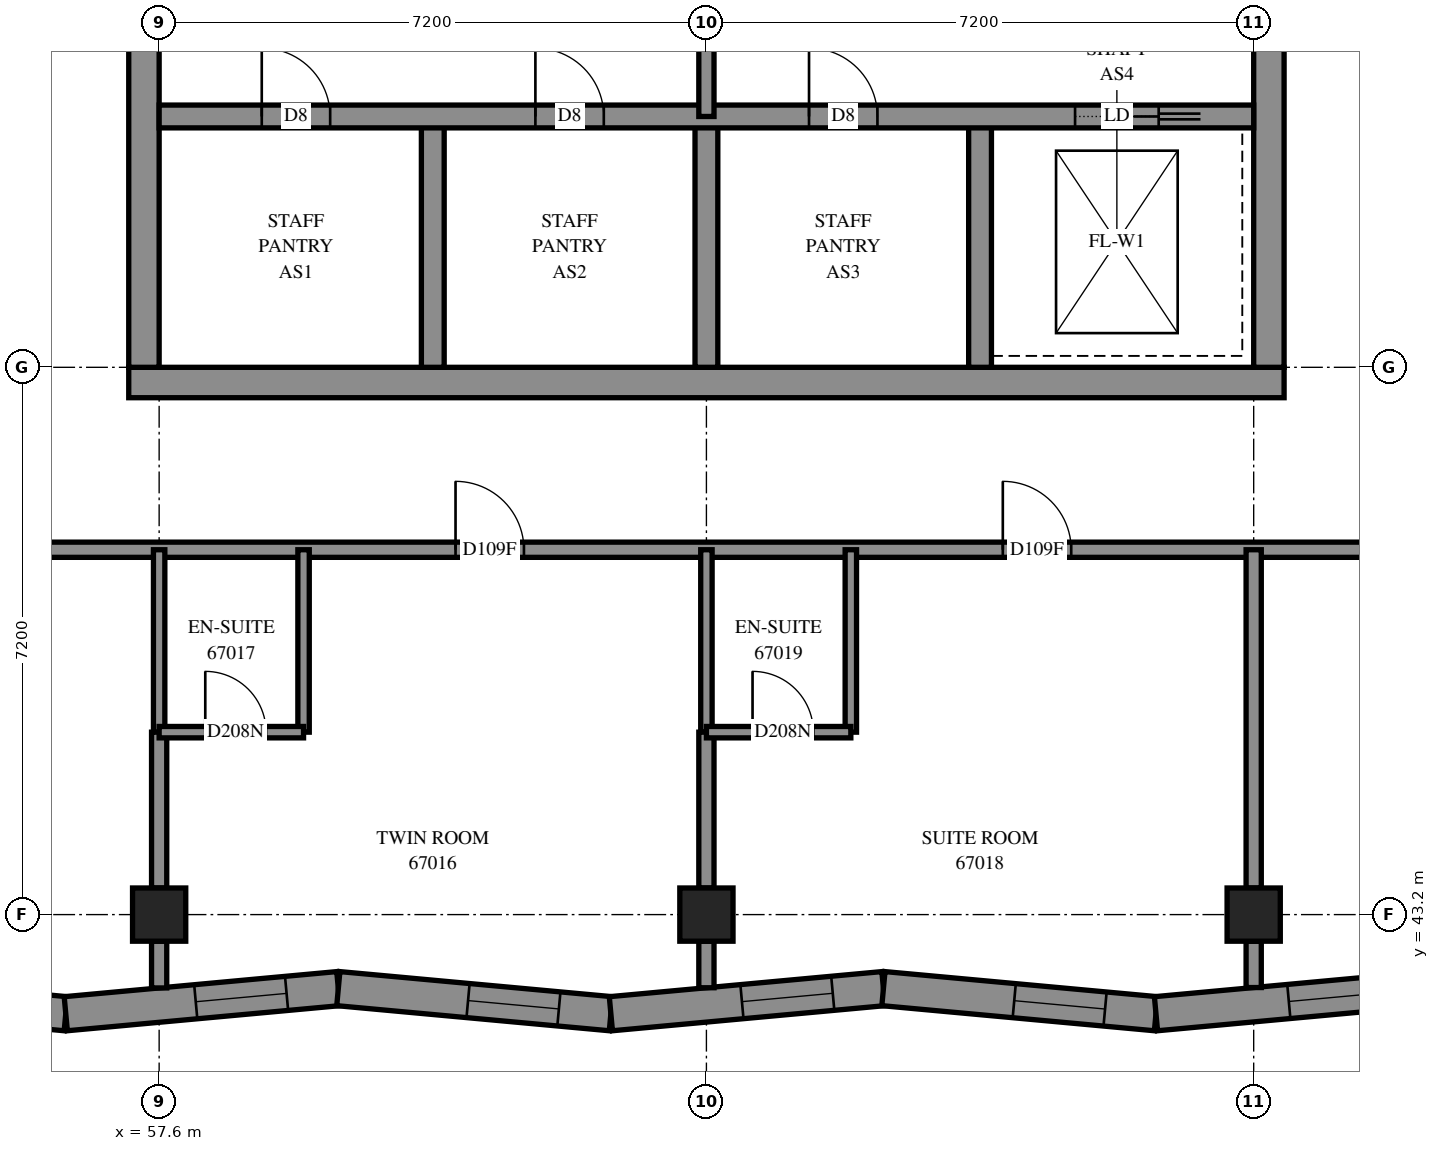
"""IFC4 building model, lengths in metres.
Left out: names, types, materials, properties, quantities, classifications, styles, units other than length and angle.
Written with IfcOpenShell. Run it as: python <this file> out.ifc"""

import sys

from ifc_helpers import new_model, si_unit, direction, frame, frame_2d, origin, origin_2d, place, context, subcontext, project, spatial, polyline, rectangle, outline, extrude, element, fill, save


model = new_model("IFC4")
c1 = context("Model", 3, precision=1e-05, world=origin(), true_north=direction((0.0, 1.0)))
c2 = subcontext(c1, "Body", "Model", "MODEL_VIEW")
j1 = project(units=[si_unit("LENGTHUNIT", "METRE"), si_unit("PLANEANGLEUNIT", "RADIAN")], contexts=[c1])
p1 = place(None, origin())
s1 = spatial("IfcSite", under=j1, at=p1, CompositionType="ELEMENT")
p2 = place(p1, origin())
s2 = spatial("IfcBuilding", under=s1, at=p2, CompositionType="ELEMENT")
p3 = place(p2, frame((0.0, 0.0, 247.2)))
s3 = spatial("IfcBuildingStorey", under=s2, at=p3, CompositionType="ELEMENT", Elevation=247.2)
for number, where, z_axis, x_axis in (
    (1, (57.6, 43.2, 0.0), (0.0, 0.0, 1.0), (1.0, 0.0, 0.0)),
    (2, (64.8, 43.2, 0.0), (0.0, 0.0, 1.0), (1.0, 0.0, 0.0)),
    (3, (72.0, 43.2, 0.0), (0.0, 0.0, 1.0), (1.0, 0.0, 0.0)),
):
    element("IfcColumn", number, at=place(p3, frame(where, z_axis=z_axis, x_axis=x_axis)), inside=s3, PredefinedType="COLUMN", context=c2, shape_type="SweptSolid", body=[
        extrude(rectangle(XDim=0.7, YDim=0.7, at=origin_2d()), origin(), (0.0, 0.0, 1.0), 3.1),
    ])
p4 = place(p3, frame((57.2, 50.2, -0.3), z_axis=(0.0, 0.0, 1.0), x_axis=(1.0, 0.0, 0.0)))
e4 = element("IfcWall", 4, at=p4, inside=s3, PredefinedType="SHEAR", context=c2, shape_type="SweptSolid", body=[
    extrude(rectangle(XDim=15.2, YDim=0.4, at=frame_2d((7.6, 0.0))), origin(), (0.0, 0.0, 1.0), 2.7),
])
p5 = place(p3, frame((57.4, 50.4, -0.3), z_axis=(0.0, 0.0, 1.0), x_axis=(0.0, 1.0, 0.0)))
e5 = element("IfcWall", 5, at=p5, inside=s3, PredefinedType="SHEAR", context=c2, shape_type="SweptSolid", body=[
    extrude(rectangle(XDim=14.4, YDim=0.4, at=frame_2d((7.2, 0.0))), origin(), (0.0, 0.0, 1.0), 2.7),
])
p6 = place(p5, frame((4.55, 0.0, 0.3)))
e6 = element("IfcOpeningElement", 6, at=p6, cuts=e5, PredefinedType="OPENING", context=c2, shape_type="SweptSolid", body=[
    extrude(rectangle(XDim=1.1, YDim=2.1, at=frame_2d((0.55, 1.05))), frame((0.0, 0.21, 0.0), z_axis=(0.0, -1.0, 0.0), x_axis=(1.0, 0.0, 0.0)), (0.0, 0.0, 1.0), 0.42),
])
p7 = place(p5, frame((11.35, 0.0, 0.3)))
e7 = element("IfcOpeningElement", 7, at=p7, cuts=e5, PredefinedType="OPENING", context=c2, shape_type="SweptSolid", body=[
    extrude(rectangle(XDim=1.1, YDim=2.1, at=frame_2d((0.55, 1.05))), frame((0.0, 0.21, 0.0), z_axis=(0.0, -1.0, 0.0), x_axis=(1.0, 0.0, 0.0)), (0.0, 0.0, 1.0), 0.42),
])
p8 = place(p3, frame((72.2, 50.4, -0.3), z_axis=(0.0, 0.0, 1.0), x_axis=(0.0, 1.0, 0.0)))
e8 = element("IfcWall", 8, at=p8, inside=s3, PredefinedType="SHEAR", context=c2, shape_type="SweptSolid", body=[
    extrude(rectangle(XDim=14.4, YDim=0.4, at=frame_2d((7.2, 0.0))), origin(), (0.0, 0.0, 1.0), 2.7),
])
p9 = place(p8, frame((4.55, 0.0, 0.3)))
e9 = element("IfcOpeningElement", 9, at=p9, cuts=e8, PredefinedType="OPENING", context=c2, shape_type="SweptSolid", body=[
    extrude(rectangle(XDim=1.1, YDim=2.1, at=frame_2d((0.55, 1.05))), frame((0.0, 0.21, 0.0), z_axis=(0.0, -1.0, 0.0), x_axis=(1.0, 0.0, 0.0)), (0.0, 0.0, 1.0), 0.42),
])
p10 = place(p8, frame((11.35, 0.0, 0.3)))
e10 = element("IfcOpeningElement", 10, at=p10, cuts=e8, PredefinedType="OPENING", context=c2, shape_type="SweptSolid", body=[
    extrude(rectangle(XDim=1.1, YDim=2.1, at=frame_2d((0.55, 1.05))), frame((0.0, 0.21, 0.0), z_axis=(0.0, -1.0, 0.0), x_axis=(1.0, 0.0, 0.0)), (0.0, 0.0, 1.0), 0.42),
])
for number, where, z_axis, x_axis in (
    (11, (61.2, 50.4, 0.0), (0.0, 0.0, 1.0), (0.0, 1.0, 0.0)),
    (12, (64.8, 50.4, 0.0), (0.0, 0.0, 1.0), (0.0, 1.0, 0.0)),
    (13, (68.4, 50.4, 0.0), (0.0, 0.0, 1.0), (0.0, 1.0, 0.0)),
):
    element("IfcWall", number, at=place(p3, frame(where, z_axis=z_axis, x_axis=x_axis)), inside=s3, PredefinedType="SOLIDWALL", context=c2, shape_type="SweptSolid", body=[
        extrude(rectangle(XDim=3.3, YDim=0.3, at=frame_2d((1.65, 0.0))), origin(), (0.0, 0.0, 1.0), 3.1),
    ])
p11 = place(p3, frame((57.6, 53.7, 0.0), z_axis=(0.0, 0.0, 1.0), x_axis=(1.0, 0.0, 0.0)))
e14 = element("IfcWall", 14, at=p11, inside=s3, PredefinedType="SOLIDWALL", context=c2, shape_type="SweptSolid", body=[
    extrude(rectangle(XDim=14.4, YDim=0.3, at=frame_2d((7.2, 0.0))), origin(), (0.0, 0.0, 1.0), 3.1),
])
p12 = place(p11, frame((1.35, 0.0, 0.0)))
e15 = element("IfcOpeningElement", 15, at=p12, cuts=e14, PredefinedType="OPENING", context=c2, shape_type="SweptSolid", body=[
    extrude(rectangle(XDim=0.9, YDim=2.1, at=frame_2d((0.45, 1.05))), frame((0.0, 0.16, 0.0), z_axis=(0.0, -1.0, 0.0), x_axis=(1.0, 0.0, 0.0)), (0.0, 0.0, 1.0), 0.32),
])
p13 = place(p11, frame((4.95, 0.0, 0.0)))
e16 = element("IfcOpeningElement", 16, at=p13, cuts=e14, PredefinedType="OPENING", context=c2, shape_type="SweptSolid", body=[
    extrude(rectangle(XDim=0.9, YDim=2.1, at=frame_2d((0.45, 1.05))), frame((0.0, 0.16, 0.0), z_axis=(0.0, -1.0, 0.0), x_axis=(1.0, 0.0, 0.0)), (0.0, 0.0, 1.0), 0.32),
])
p14 = place(p11, frame((8.55, 0.0, 0.0)))
e17 = element("IfcOpeningElement", 17, at=p14, cuts=e14, PredefinedType="OPENING", context=c2, shape_type="SweptSolid", body=[
    extrude(rectangle(XDim=0.9, YDim=2.1, at=frame_2d((0.45, 1.05))), frame((0.0, 0.16, 0.0), z_axis=(0.0, -1.0, 0.0), x_axis=(1.0, 0.0, 0.0)), (0.0, 0.0, 1.0), 0.32),
])
p15 = place(p11, frame((12.05, 0.0, 0.0)))
e18 = element("IfcOpeningElement", 18, at=p15, cuts=e14, PredefinedType="OPENING", context=c2, shape_type="SweptSolid", body=[
    extrude(rectangle(XDim=1.1, YDim=2.1, at=frame_2d((0.55, 1.05))), frame((0.0, 0.16, 0.0), z_axis=(0.0, -1.0, 0.0), x_axis=(1.0, 0.0, 0.0)), (0.0, 0.0, 1.0), 0.32),
])
p16 = place(p3, frame((52.767, 42.228, 0.0), z_axis=(0.0, 0.0, 1.0), x_axis=(0.9957918129, -0.0916442329, 0.0)))
e19 = element("IfcWall", 19, at=p16, inside=s3, PredefinedType="SOLIDWALL", context=c2, shape_type="SweptSolid", body=[
    extrude(outline(polyline([(0.039, -0.225), (3.64, -0.225), (3.599, 0.225), (-0.039, 0.225), (0.039, -0.225)])), origin(), (0.0, 0.0, 1.0), 3.1),
])
p17 = place(p16, frame((1.718, 0.0, 0.45)))
e20 = element("IfcOpeningElement", 20, at=p17, cuts=e19, PredefinedType="OPENING", context=c2, shape_type="SweptSolid", body=[
    extrude(rectangle(XDim=1.2, YDim=2.55, at=frame_2d((0.6, 1.275))), frame((0.0, 0.235, 0.0), z_axis=(0.0, -1.0, 0.0), x_axis=(1.0, 0.0, 0.0)), (0.0, 0.0, 1.0), 0.47),
])
p18 = place(p3, frame((56.371, 41.896, 0.0), z_axis=(0.0, 0.0, 1.0), x_axis=(0.9957917474, 0.0916449443, 0.0)))
e21 = element("IfcWall", 21, at=p18, inside=s3, PredefinedType="SOLIDWALL", context=c2, shape_type="SweptSolid", body=[
    extrude(outline(polyline([(-0.021, -0.225), (3.58, -0.225), (3.622, 0.225), (0.021, 0.225), (-0.021, -0.225)])), origin(), (0.0, 0.0, 1.0), 3.1),
])
p19 = place(p18, frame((1.717, 0.0, 0.45)))
e22 = element("IfcOpeningElement", 22, at=p19, cuts=e21, PredefinedType="OPENING", context=c2, shape_type="SweptSolid", body=[
    extrude(rectangle(XDim=1.2, YDim=2.55, at=frame_2d((0.6, 1.275))), frame((0.0, 0.235, 0.0), z_axis=(0.0, -1.0, 0.0), x_axis=(1.0, 0.0, 0.0)), (0.0, 0.0, 1.0), 0.47),
])
p20 = place(p3, frame((59.957, 42.226, 0.0), z_axis=(0.0, 0.0, 1.0), x_axis=(0.9957917474, -0.0916449443, 0.0)))
e23 = element("IfcWall", 23, at=p20, inside=s3, PredefinedType="SOLIDWALL", context=c2, shape_type="SweptSolid", body=[
    extrude(outline(polyline([(0.021, -0.225), (3.622, -0.225), (3.58, 0.225), (-0.021, 0.225), (0.021, -0.225)])), origin(), (0.0, 0.0, 1.0), 3.1),
])
p21 = place(p20, frame((1.714, 0.0, 0.45)))
e24 = element("IfcOpeningElement", 24, at=p21, cuts=e23, PredefinedType="OPENING", context=c2, shape_type="SweptSolid", body=[
    extrude(rectangle(XDim=1.2, YDim=2.55, at=frame_2d((0.6, 1.275))), frame((0.0, 0.235, 0.0), z_axis=(0.0, -1.0, 0.0), x_axis=(1.0, 0.0, 0.0)), (0.0, 0.0, 1.0), 0.47),
])
p22 = place(p3, frame((63.543, 41.896, 0.0), z_axis=(0.0, 0.0, 1.0), x_axis=(0.9957919806, 0.09164241, 0.0)))
e25 = element("IfcWall", 25, at=p22, inside=s3, PredefinedType="SOLIDWALL", context=c2, shape_type="SweptSolid", body=[
    extrude(outline(polyline([(-0.021, -0.225), (3.58, -0.225), (3.622, 0.225), (0.021, 0.225), (-0.021, -0.225)])), origin(), (0.0, 0.0, 1.0), 3.1),
])
p23 = place(p22, frame((1.732, 0.0, 0.45)))
e26 = element("IfcOpeningElement", 26, at=p23, cuts=e25, PredefinedType="OPENING", context=c2, shape_type="SweptSolid", body=[
    extrude(rectangle(XDim=1.2, YDim=2.55, at=frame_2d((0.6, 1.275))), frame((0.0, 0.235, 0.0), z_axis=(0.0, -1.0, 0.0), x_axis=(1.0, 0.0, 0.0)), (0.0, 0.0, 1.0), 0.47),
])
p24 = place(p3, frame((67.129, 42.226, 0.0), z_axis=(0.0, 0.0, 1.0), x_axis=(0.9957917474, -0.0916449443, 0.0)))
e27 = element("IfcWall", 27, at=p24, inside=s3, PredefinedType="SOLIDWALL", context=c2, shape_type="SweptSolid", body=[
    extrude(outline(polyline([(0.021, -0.225), (3.622, -0.225), (3.58, 0.225), (-0.021, 0.225), (0.021, -0.225)])), origin(), (0.0, 0.0, 1.0), 3.1),
])
p25 = place(p24, frame((1.728, 0.0, 0.45)))
e28 = element("IfcOpeningElement", 28, at=p25, cuts=e27, PredefinedType="OPENING", context=c2, shape_type="SweptSolid", body=[
    extrude(rectangle(XDim=1.2, YDim=2.55, at=frame_2d((0.6, 1.275))), frame((0.0, 0.235, 0.0), z_axis=(0.0, -1.0, 0.0), x_axis=(1.0, 0.0, 0.0)), (0.0, 0.0, 1.0), 0.47),
])
p26 = place(p3, frame((70.714, 41.896, 0.0), z_axis=(0.0, 0.0, 1.0), x_axis=(0.9957918129, 0.0916442329, 0.0)))
e29 = element("IfcWall", 29, at=p26, inside=s3, PredefinedType="SOLIDWALL", context=c2, shape_type="SweptSolid", body=[
    extrude(outline(polyline([(-0.021, -0.225), (3.58, -0.225), (3.659, 0.225), (0.021, 0.225), (-0.021, -0.225)])), origin(), (0.0, 0.0, 1.0), 3.1),
])
p27 = place(p26, frame((1.755, 0.0, 0.45)))
e30 = element("IfcOpeningElement", 30, at=p27, cuts=e29, PredefinedType="OPENING", context=c2, shape_type="SweptSolid", body=[
    extrude(rectangle(XDim=1.2, YDim=2.55, at=frame_2d((0.6, 1.275))), frame((0.0, 0.235, 0.0), z_axis=(0.0, -1.0, 0.0), x_axis=(1.0, 0.0, 0.0)), (0.0, 0.0, 1.0), 0.47),
])
p28 = place(p3, frame((64.8, 53.7, 0.0), z_axis=(0.0, 0.0, 1.0), x_axis=(0.0, 1.0, 0.0)))
e31 = element("IfcWall", 31, at=p28, inside=s3, PredefinedType="PARTITIONING", context=c2, shape_type="SweptSolid", body=[
    extrude(rectangle(XDim=3.6, YDim=0.2, at=frame_2d((1.8, 0.0))), origin(), (0.0, 0.0, 1.0), 3.1),
])
p29 = place(p3, frame((55.2, 48.0, 0.0), z_axis=(0.0, 0.0, 1.0), x_axis=(1.0, 0.0, 0.0)))
e32 = element("IfcWall", 32, at=p29, inside=s3, PredefinedType="PARTITIONING", context=c2, shape_type="SweptSolid", body=[
    extrude(rectangle(XDim=19.15, YDim=0.2, at=frame_2d((9.575, 0.0))), origin(), (0.0, 0.0, 1.0), 3.1),
])
p30 = place(p29, frame((6.299, 0.0, 0.0)))
e33 = element("IfcOpeningElement", 33, at=p30, cuts=e32, PredefinedType="OPENING", context=c2, shape_type="SweptSolid", body=[
    extrude(rectangle(XDim=0.9, YDim=2.1, at=frame_2d((0.45, 1.05))), frame((0.0, 0.11, 0.0), z_axis=(0.0, -1.0, 0.0), x_axis=(1.0, 0.0, 0.0)), (0.0, 0.0, 1.0), 0.22),
])
p31 = place(p29, frame((13.499, 0.0, 0.0)))
e34 = element("IfcOpeningElement", 34, at=p31, cuts=e32, PredefinedType="OPENING", context=c2, shape_type="SweptSolid", body=[
    extrude(rectangle(XDim=0.9, YDim=2.1, at=frame_2d((0.45, 1.05))), frame((0.0, 0.11, 0.0), z_axis=(0.0, -1.0, 0.0), x_axis=(1.0, 0.0, 0.0)), (0.0, 0.0, 1.0), 0.22),
])
p32 = place(p3, frame((72.0, 43.55, 0.0), z_axis=(0.0, 0.0, 1.0), x_axis=(0.0, 1.0, 0.0)))
e35 = element("IfcWall", 35, at=p32, inside=s3, PredefinedType="PARTITIONING", context=c2, shape_type="SweptSolid", body=[
    extrude(rectangle(XDim=4.45, YDim=0.2, at=frame_2d((2.225, 0.0))), origin(), (0.0, 0.0, 1.0), 3.1),
])
for number, where, z_axis, x_axis in (
    (36, (59.5, 45.6, 0.0), (0.0, 0.0, 1.0), (0.0, 1.0, 0.0)),
    (37, (57.6, 45.6, 0.0), (0.0, 0.0, 1.0), (0.0, 1.0, 0.0)),
    (38, (66.7, 45.6, 0.0), (0.0, 0.0, 1.0), (0.0, 1.0, 0.0)),
    (39, (64.8, 45.6, 0.0), (0.0, 0.0, 1.0), (0.0, 1.0, 0.0)),
):
    element("IfcWall", number, at=place(p3, frame(where, z_axis=z_axis, x_axis=x_axis)), inside=s3, PredefinedType="PARTITIONING", context=c2, shape_type="SweptSolid", body=[
        extrude(rectangle(XDim=2.4, YDim=0.15, at=frame_2d((1.2, 0.0))), origin(), (0.0, 0.0, 1.0), 3.1),
    ])
for number, where, z_axis, x_axis in (
    (40, (57.6, 43.55, 0.0), (0.0, 0.0, 1.0), (0.0, 1.0, 0.0)),
    (41, (64.8, 43.55, 0.0), (0.0, 0.0, 1.0), (0.0, 1.0, 0.0)),
):
    element("IfcWall", number, at=place(p3, frame(where, z_axis=z_axis, x_axis=x_axis)), inside=s3, PredefinedType="PARTITIONING", context=c2, shape_type="SweptSolid", body=[
        extrude(rectangle(XDim=2.05, YDim=0.2, at=frame_2d((1.025, 0.0))), origin(), (0.0, 0.0, 1.0), 3.1),
    ])
p33 = place(p3, frame((64.8, 45.6, 0.0), z_axis=(0.0, 0.0, 1.0), x_axis=(1.0, 0.0, 0.0)))
e42 = element("IfcWall", 42, at=p33, inside=s3, PredefinedType="PARTITIONING", context=c2, shape_type="SweptSolid", body=[
    extrude(rectangle(XDim=1.9, YDim=0.15, at=frame_2d((0.95, 0.0))), origin(), (0.0, 0.0, 1.0), 3.1),
])
p34 = place(p33, frame((0.607, 0.0, 0.0)))
e43 = element("IfcOpeningElement", 43, at=p34, cuts=e42, PredefinedType="OPENING", context=c2, shape_type="SweptSolid", body=[
    extrude(rectangle(XDim=0.8, YDim=2.1, at=frame_2d((0.4, 1.05))), frame((0.0, 0.085, 0.0), z_axis=(0.0, -1.0, 0.0), x_axis=(1.0, 0.0, 0.0)), (0.0, 0.0, 1.0), 0.17),
])
p35 = place(p3, frame((57.6, 45.6, 0.0), z_axis=(0.0, 0.0, 1.0), x_axis=(1.0, 0.0, 0.0)))
e44 = element("IfcWall", 44, at=p35, inside=s3, PredefinedType="PARTITIONING", context=c2, shape_type="SweptSolid", body=[
    extrude(rectangle(XDim=1.9, YDim=0.15, at=frame_2d((0.95, 0.0))), origin(), (0.0, 0.0, 1.0), 3.1),
])
p36 = place(p35, frame((0.607, 0.0, 0.0)))
e45 = element("IfcOpeningElement", 45, at=p36, cuts=e44, PredefinedType="OPENING", context=c2, shape_type="SweptSolid", body=[
    extrude(rectangle(XDim=0.8, YDim=2.1, at=frame_2d((0.4, 1.05))), frame((0.0, 0.085, 0.0), z_axis=(0.0, -1.0, 0.0), x_axis=(1.0, 0.0, 0.0)), (0.0, 0.0, 1.0), 0.17),
])
p37 = place(p3, frame((57.6, 42.235, 0.0), z_axis=(0.0, 0.0, 1.0), x_axis=(0.0, 1.0, 0.0)))
e46 = element("IfcWall", 46, at=p37, inside=s3, PredefinedType="PARTITIONING", context=c2, shape_type="SweptSolid", body=[
    extrude(rectangle(XDim=0.615, YDim=0.2, at=frame_2d((0.307, 0.0))), origin(), (0.0, 0.0, 1.0), 3.1),
])
p38 = place(p3, frame((64.8, 42.238, 0.0), z_axis=(0.0, 0.0, 1.0), x_axis=(0.0, 1.0, 0.0)))
e47 = element("IfcWall", 47, at=p38, inside=s3, PredefinedType="PARTITIONING", context=c2, shape_type="SweptSolid", body=[
    extrude(rectangle(XDim=0.612, YDim=0.2, at=frame_2d((0.306, 0.0))), origin(), (0.0, 0.0, 1.0), 3.1),
])
p39 = place(p3, frame((72.0, 42.24, 0.0), z_axis=(0.0, 0.0, 1.0), x_axis=(0.0, 1.0, 0.0)))
e48 = element("IfcWall", 48, at=p39, inside=s3, PredefinedType="PARTITIONING", context=c2, shape_type="SweptSolid", body=[
    extrude(rectangle(XDim=0.61, YDim=0.2, at=frame_2d((0.305, 0.0))), origin(), (0.0, 0.0, 1.0), 3.1),
])
p40 = place(p19, origin())
e49 = element("IfcWindow", 49, at=p40, inside=s3, PartitioningType="SINGLE_PANEL", PredefinedType="WINDOW", context=c2, shape_type="SweptSolid", body=[
    extrude(rectangle(XDim=1.2, YDim=2.55, at=frame_2d((0.6, 1.275))), frame((0.0, 0.205, 0.0), z_axis=(0.0, -1.0, 0.0), x_axis=(1.0, 0.0, 0.0)), (0.0, 0.0, 1.0), 0.06),
])
fill(e22, e49)
p41 = place(p21, origin())
e50 = element("IfcWindow", 50, at=p41, inside=s3, PartitioningType="SINGLE_PANEL", PredefinedType="WINDOW", context=c2, shape_type="SweptSolid", body=[
    extrude(rectangle(XDim=1.2, YDim=2.55, at=frame_2d((0.6, 1.275))), frame((0.0, 0.205, 0.0), z_axis=(0.0, -1.0, 0.0), x_axis=(1.0, 0.0, 0.0)), (0.0, 0.0, 1.0), 0.06),
])
fill(e24, e50)
p42 = place(p23, origin())
e51 = element("IfcWindow", 51, at=p42, inside=s3, PartitioningType="SINGLE_PANEL", PredefinedType="WINDOW", context=c2, shape_type="SweptSolid", body=[
    extrude(rectangle(XDim=1.2, YDim=2.55, at=frame_2d((0.6, 1.275))), frame((0.0, 0.205, 0.0), z_axis=(0.0, -1.0, 0.0), x_axis=(1.0, 0.0, 0.0)), (0.0, 0.0, 1.0), 0.06),
])
fill(e26, e51)
p43 = place(p25, origin())
e52 = element("IfcWindow", 52, at=p43, inside=s3, PartitioningType="SINGLE_PANEL", PredefinedType="WINDOW", context=c2, shape_type="SweptSolid", body=[
    extrude(rectangle(XDim=1.2, YDim=2.55, at=frame_2d((0.6, 1.275))), frame((0.0, 0.205, 0.0), z_axis=(0.0, -1.0, 0.0), x_axis=(1.0, 0.0, 0.0)), (0.0, 0.0, 1.0), 0.06),
])
fill(e28, e52)
p44 = place(p27, origin())
e53 = element("IfcWindow", 53, at=p44, inside=s3, PartitioningType="SINGLE_PANEL", PredefinedType="WINDOW", context=c2, shape_type="SweptSolid", body=[
    extrude(rectangle(XDim=1.2, YDim=2.55, at=frame_2d((0.6, 1.275))), frame((0.0, 0.205, 0.0), z_axis=(0.0, -1.0, 0.0), x_axis=(1.0, 0.0, 0.0)), (0.0, 0.0, 1.0), 0.06),
])
fill(e30, e53)
p45 = place(p12, origin())
e54 = element("IfcDoor", 54, at=p45, inside=s3, OperationType="SINGLE_SWING_LEFT", PredefinedType="DOOR", context=c2, shape_type="SweptSolid", body=[
    extrude(rectangle(XDim=0.9, YDim=2.1, at=frame_2d((0.45, 1.05))), frame((0.0, 0.025, 0.0), z_axis=(0.0, -1.0, 0.0), x_axis=(1.0, 0.0, 0.0)), (0.0, 0.0, 1.0), 0.05),
])
fill(e15, e54)
p46 = place(p13, origin())
e55 = element("IfcDoor", 55, at=p46, inside=s3, OperationType="SINGLE_SWING_LEFT", PredefinedType="DOOR", context=c2, shape_type="SweptSolid", body=[
    extrude(rectangle(XDim=0.9, YDim=2.1, at=frame_2d((0.45, 1.05))), frame((0.0, 0.025, 0.0), z_axis=(0.0, -1.0, 0.0), x_axis=(1.0, 0.0, 0.0)), (0.0, 0.0, 1.0), 0.05),
])
fill(e16, e55)
p47 = place(p14, origin())
e56 = element("IfcDoor", 56, at=p47, inside=s3, OperationType="SINGLE_SWING_LEFT", PredefinedType="DOOR", context=c2, shape_type="SweptSolid", body=[
    extrude(rectangle(XDim=0.9, YDim=2.1, at=frame_2d((0.45, 1.05))), frame((0.0, 0.025, 0.0), z_axis=(0.0, -1.0, 0.0), x_axis=(1.0, 0.0, 0.0)), (0.0, 0.0, 1.0), 0.05),
])
fill(e17, e56)
p48 = place(p15, origin())
e57 = element("IfcDoor", 57, at=p48, inside=s3, OperationType="SLIDING_TO_RIGHT", PredefinedType="DOOR", context=c2, shape_type="SweptSolid", body=[
    extrude(rectangle(XDim=1.1, YDim=2.1, at=frame_2d((0.55, 1.05))), frame((0.0, 0.025, 0.0), z_axis=(0.0, -1.0, 0.0), x_axis=(1.0, 0.0, 0.0)), (0.0, 0.0, 1.0), 0.05),
])
fill(e18, e57)
p49 = place(p30, origin())
e58 = element("IfcDoor", 58, at=p49, inside=s3, OperationType="SINGLE_SWING_LEFT", PredefinedType="DOOR", context=c2, shape_type="SweptSolid", body=[
    extrude(rectangle(XDim=0.9, YDim=2.1, at=frame_2d((0.45, 1.05))), frame((0.0, 0.025, 0.0), z_axis=(0.0, -1.0, 0.0), x_axis=(1.0, 0.0, 0.0)), (0.0, 0.0, 1.0), 0.05),
])
fill(e33, e58)
p50 = place(p36, origin())
e59 = element("IfcDoor", 59, at=p50, inside=s3, OperationType="SINGLE_SWING_RIGHT", PredefinedType="DOOR", context=c2, shape_type="SweptSolid", body=[
    extrude(rectangle(XDim=0.8, YDim=2.1, at=frame_2d((0.4, 1.05))), frame((0.0, 0.025, 0.0), z_axis=(0.0, -1.0, 0.0), x_axis=(1.0, 0.0, 0.0)), (0.0, 0.0, 1.0), 0.05),
])
fill(e45, e59)
p51 = place(p31, origin())
e60 = element("IfcDoor", 60, at=p51, inside=s3, OperationType="SINGLE_SWING_LEFT", PredefinedType="DOOR", context=c2, shape_type="SweptSolid", body=[
    extrude(rectangle(XDim=0.9, YDim=2.1, at=frame_2d((0.45, 1.05))), frame((0.0, 0.025, 0.0), z_axis=(0.0, -1.0, 0.0), x_axis=(1.0, 0.0, 0.0)), (0.0, 0.0, 1.0), 0.05),
])
fill(e34, e60)
p52 = place(p34, origin())
e61 = element("IfcDoor", 61, at=p52, inside=s3, OperationType="SINGLE_SWING_RIGHT", PredefinedType="DOOR", context=c2, shape_type="SweptSolid", body=[
    extrude(rectangle(XDim=0.8, YDim=2.1, at=frame_2d((0.4, 1.05))), frame((0.0, 0.025, 0.0), z_axis=(0.0, -1.0, 0.0), x_axis=(1.0, 0.0, 0.0)), (0.0, 0.0, 1.0), 0.05),
])
fill(e43, e61)
save(model, sys.argv[1])
